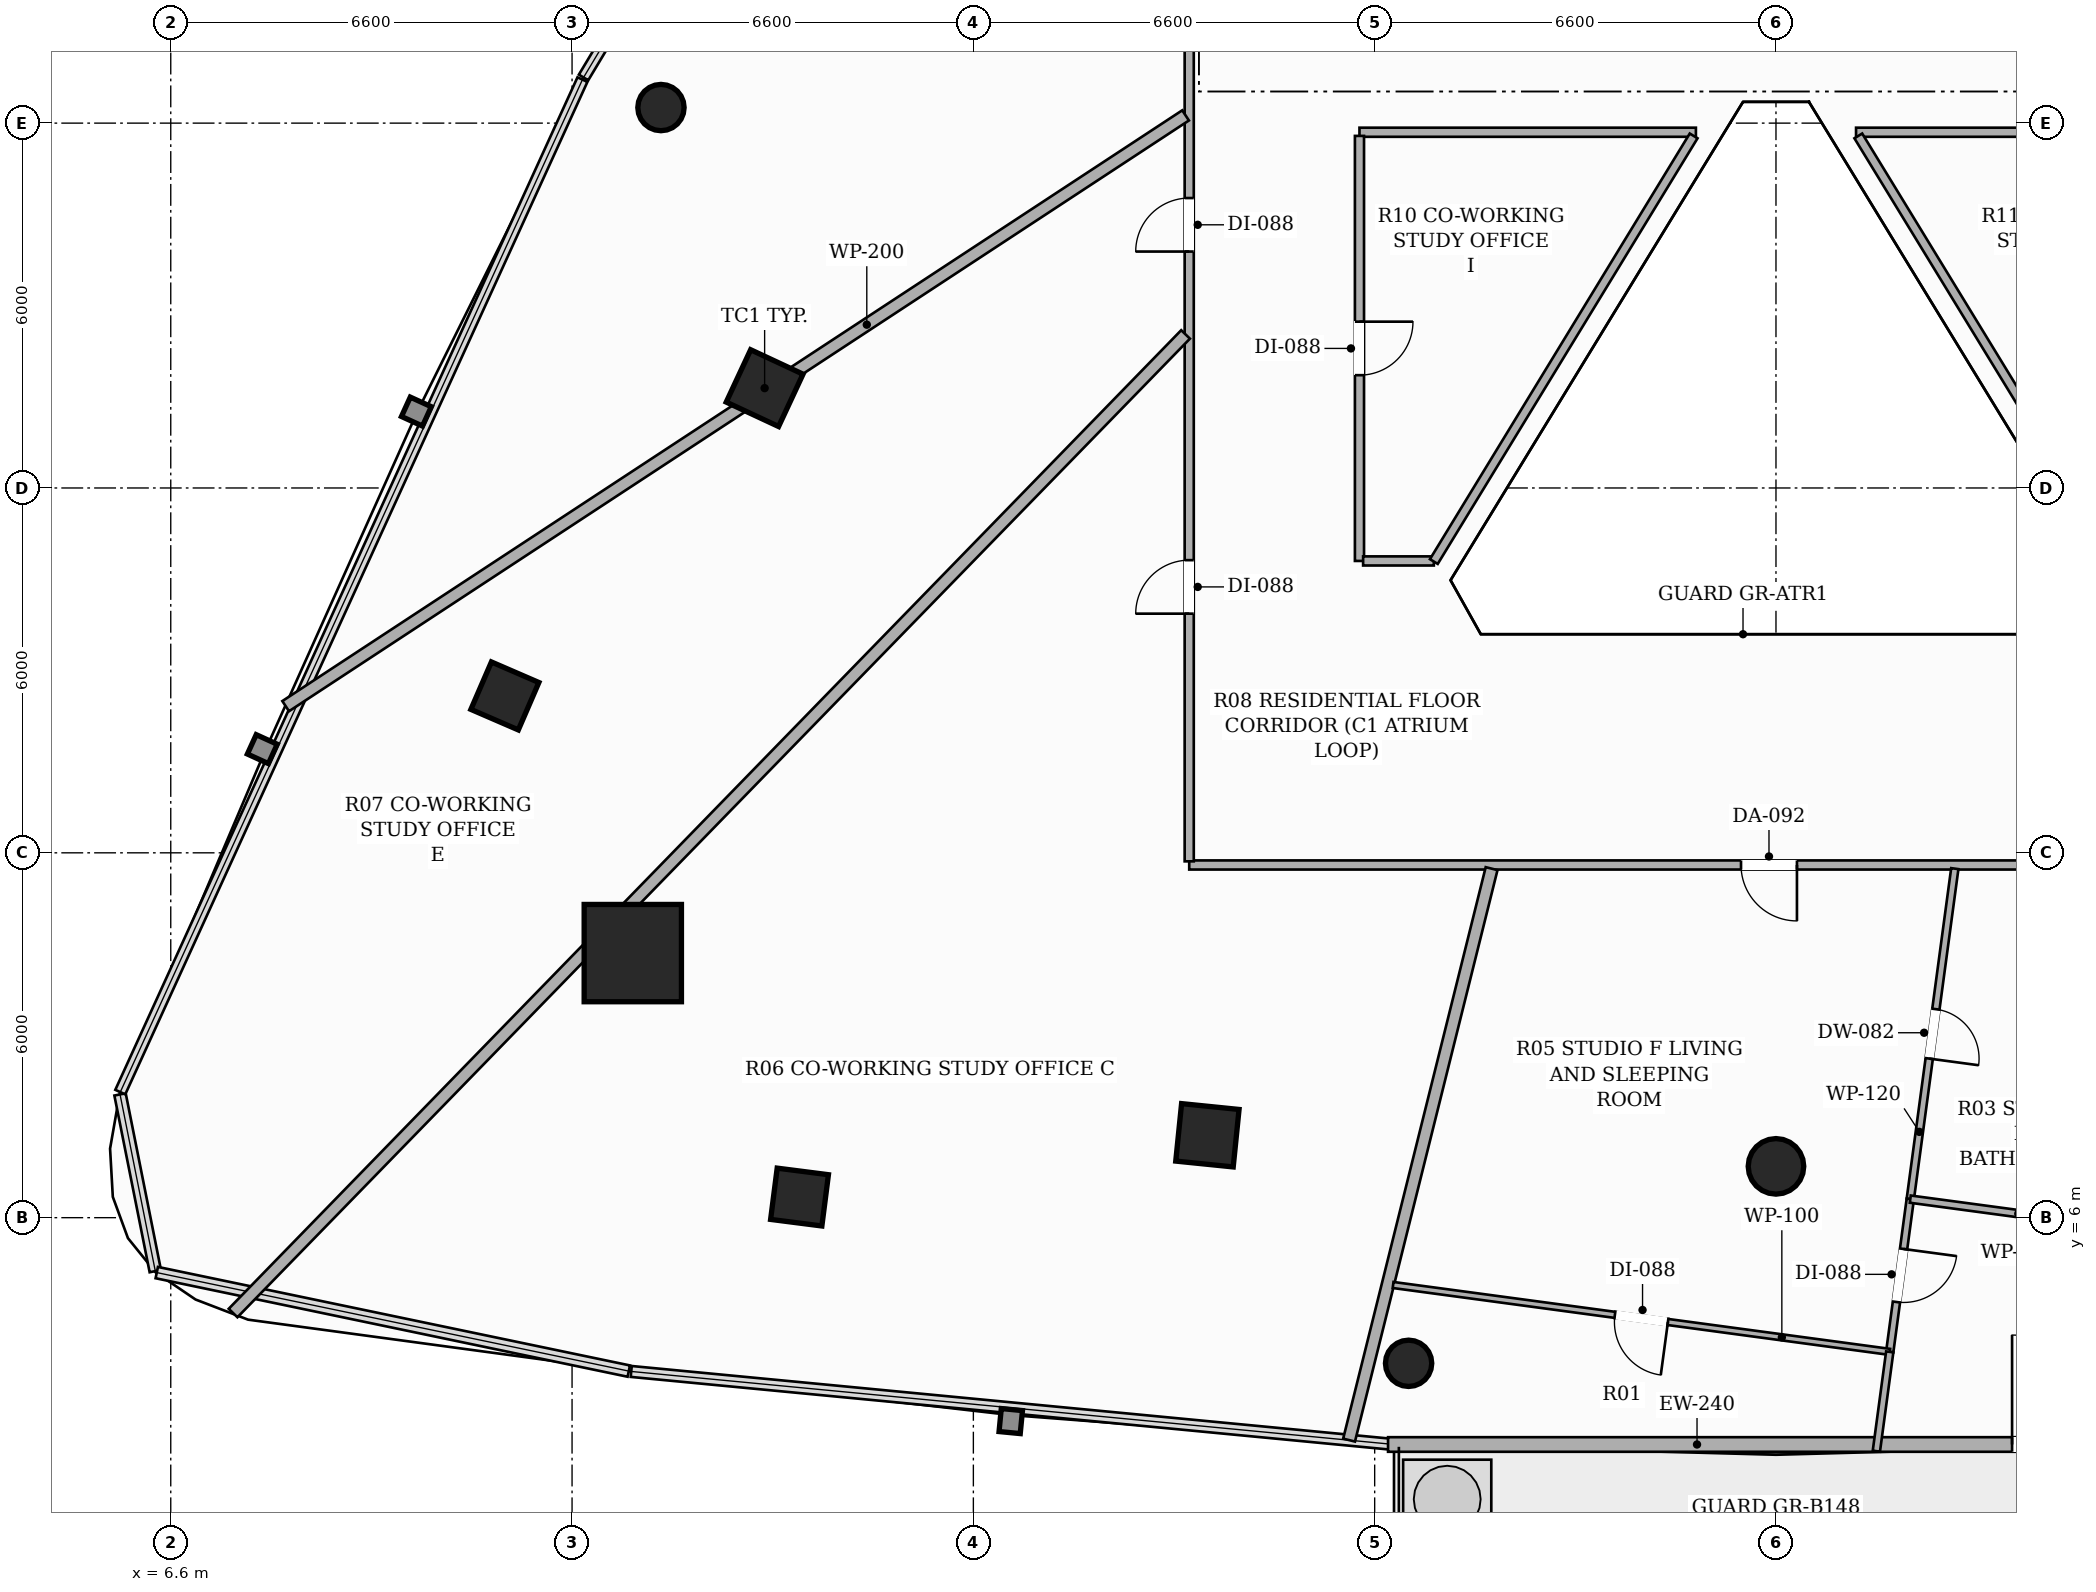
"""IFC4 building model, lengths in metres.
Left out: names, types, materials, properties, quantities, classifications, styles, units other than length and angle.
Written with IfcOpenShell. Run it as: python <this file> out.ifc"""

import sys

from ifc_helpers import new_model, si_unit, direction, frame, frame_2d, origin, origin_2d, place, context, subcontext, project, spatial, rectangle, hollow_rectangle, hollow_circle, extrude, element, fill, save


model = new_model("IFC4")
c1 = context("Model", 3, precision=1e-05, world=origin(), true_north=direction((0.0, 1.0)))
c2 = subcontext(c1, "Body", "Model", "MODEL_VIEW")
j1 = project(units=[si_unit("LENGTHUNIT", "METRE"), si_unit("PLANEANGLEUNIT", "RADIAN")], contexts=[c1])
p1 = place(None, origin())
s1 = spatial("IfcSite", under=j1, at=p1, CompositionType="ELEMENT")
p2 = place(p1, origin())
s2 = spatial("IfcBuilding", under=s1, at=p2, CompositionType="ELEMENT")
p3 = place(p2, frame((0.0, 0.0, 84.05)))
s3 = spatial("IfcBuildingStorey", under=s2, at=p3, CompositionType="ELEMENT", Elevation=84.05)
p4 = place(p3, frame((14.199, 10.351, 0.0), z_axis=(0.0, 0.0, 1.0), x_axis=(1.0, 0.0, 0.0)))
e1 = element("IfcColumn", 1, at=p4, inside=s3, PredefinedType="COLUMN", context=c2, shape_type="SweptSolid", body=[
    extrude(hollow_rectangle(XDim=1.6, YDim=1.6, WallThickness=0.05, at=origin_2d()), origin(), (0.0, 0.0, 1.0), 3.3),
])
for number, where, z_axis, x_axis in (
    (2, (16.367, 19.642, 0.0), (0.0, 0.0, 1.0), (0.423, 0.906, 0.0)),
    (3, (23.649, 7.355, 0.0), (0.0, 0.0, 1.0), (-0.995, 0.101, 0.0)),
):
    element("IfcColumn", number, at=place(p3, frame(where, z_axis=z_axis, x_axis=x_axis)), inside=s3, PredefinedType="COLUMN", context=c2, shape_type="SweptSolid", body=[
        extrude(hollow_rectangle(XDim=0.95, YDim=0.95, WallThickness=0.032, at=origin_2d()), origin(), (0.0, 0.0, 1.0), 3.3),
    ])
p5 = place(p3, frame((33.0, 6.844, 0.0), z_axis=(0.0, 0.0, 1.0), x_axis=(1.0, 0.0, 0.0)))
e4 = element("IfcColumn", 4, at=p5, inside=s3, PredefinedType="COLUMN", context=c2, shape_type="SweptSolid", body=[
    extrude(hollow_circle(Radius=0.457, WallThickness=0.025, at=origin_2d()), origin(), (0.0, 0.0, 1.0), 3.3),
])
for number, where, z_axis, x_axis in (
    (5, (12.095, 14.58, 0.0), (0.0, 0.0, 1.0), (0.397, 0.918, 0.0)),
    (6, (16.941, 6.339, 0.0), (0.0, 0.0, 1.0), (-0.992, 0.127, 0.0)),
):
    element("IfcColumn", number, at=place(p3, frame(where, z_axis=z_axis, x_axis=x_axis)), inside=s3, PredefinedType="COLUMN", context=c2, shape_type="SweptSolid", body=[
        extrude(hollow_rectangle(XDim=0.85, YDim=0.85, WallThickness=0.028, at=origin_2d()), origin(), (0.0, 0.0, 1.0), 3.3),
    ])
for number, where, z_axis, x_axis in (
    (7, (14.662, 24.256, 0.0), (0.0, 0.0, 1.0), (1.0, 0.0, 0.0)),
    (8, (26.958, 3.605, 0.0), (0.0, 0.0, 1.0), (1.0, 0.0, 0.0)),
):
    element("IfcColumn", number, at=place(p3, frame(where, z_axis=z_axis, x_axis=x_axis)), inside=s3, PredefinedType="COLUMN", context=c2, shape_type="SweptSolid", body=[
        extrude(hollow_circle(Radius=0.381, WallThickness=0.022, at=origin_2d()), origin(), (0.0, 0.0, 1.0), 3.3),
    ])
p6 = place(p3, frame((26.62, 2.27, 0.0), z_axis=(0.0, 0.0, 1.0), x_axis=(1.0, 0.0, 0.0)))
e9 = element("IfcWall", 9, at=p6, inside=s3, PredefinedType="SOLIDWALL", context=c2, shape_type="SweptSolid", body=[
    extrude(rectangle(XDim=12.76, YDim=0.24, at=frame_2d((6.38, 0.0))), origin(), (0.0, 0.0, 1.0), 2.624),
])
p7 = place(p6, frame((10.263, 0.0, 0.0)))
e10 = element("IfcOpeningElement", 10, at=p7, cuts=e9, PredefinedType="OPENING", context=c2, shape_type="SweptSolid", body=[
    extrude(rectangle(XDim=1.8, YDim=2.2, at=frame_2d((0.9, 1.1))), frame((0.0, 0.13, 0.0), z_axis=(0.0, -1.0, 0.0), x_axis=(1.0, 0.0, 0.0)), (0.0, 0.0, 1.0), 0.26),
])
p8 = place(p3, frame((42.59, 11.8, 0.0), z_axis=(0.0, 0.0, 1.0), x_axis=(-1.0, 0.0, 0.0)))
e11 = element("IfcWall", 11, at=p8, inside=s3, PredefinedType="PARTITIONING", context=c2, shape_type="SweptSolid", body=[
    extrude(rectangle(XDim=19.24, YDim=0.15, at=frame_2d((9.62, 0.0))), origin(), (0.0, 0.0, 1.0), 2.669),
])
p9 = place(p8, frame((9.245, 0.0, 0.0)))
e12 = element("IfcOpeningElement", 12, at=p9, cuts=e11, PredefinedType="OPENING", context=c2, shape_type="SweptSolid", body=[
    extrude(rectangle(XDim=0.92, YDim=2.15, at=frame_2d((0.46, 1.075))), frame((0.0, 0.085, 0.0), z_axis=(0.0, -1.0, 0.0), x_axis=(1.0, 0.0, 0.0)), (0.0, 0.0, 1.0), 0.17),
])
p10 = place(p3, frame((23.35, 11.86, 0.0), z_axis=(0.0, 0.0, 1.0), x_axis=(0.0, 1.0, 0.0)))
e13 = element("IfcWall", 13, at=p10, inside=s3, PredefinedType="PARTITIONING", context=c2, shape_type="SweptSolid", body=[
    extrude(rectangle(XDim=25.04, YDim=0.15, at=frame_2d((12.52, 0.0))), origin(), (0.0, 0.0, 1.0), 2.413),
])
p11 = place(p10, frame((18.061, 0.0, 0.0)))
e14 = element("IfcOpeningElement", 14, at=p11, cuts=e13, PredefinedType="OPENING", context=c2, shape_type="SweptSolid", body=[
    extrude(rectangle(XDim=0.88, YDim=2.1, at=frame_2d((0.44, 1.05))), frame((0.0, 0.085, 0.0), z_axis=(0.0, -1.0, 0.0), x_axis=(1.0, 0.0, 0.0)), (0.0, 0.0, 1.0), 0.17),
])
p12 = place(p10, frame((4.073, 0.0, 0.0)))
e15 = element("IfcOpeningElement", 15, at=p12, cuts=e13, PredefinedType="OPENING", context=c2, shape_type="SweptSolid", body=[
    extrude(rectangle(XDim=0.88, YDim=2.1, at=frame_2d((0.44, 1.05))), frame((0.0, 0.085, 0.0), z_axis=(0.0, -1.0, 0.0), x_axis=(1.0, 0.0, 0.0)), (0.0, 0.0, 1.0), 0.17),
])
p13 = place(p10, frame((10.028, 0.0, 0.0)))
e16 = element("IfcOpeningElement", 16, at=p13, cuts=e13, PredefinedType="OPENING", context=c2, shape_type="SweptSolid", body=[
    extrude(rectangle(XDim=0.88, YDim=2.1, at=frame_2d((0.44, 1.05))), frame((0.0, 0.085, 0.0), z_axis=(0.0, -1.0, 0.0), x_axis=(1.0, 0.0, 0.0)), (0.0, 0.0, 1.0), 0.17),
])
p14 = place(p3, frame((31.683, 23.85, 0.0), z_axis=(0.0, 0.0, 1.0), x_axis=(-1.0, 0.0, 0.0)))
e17 = element("IfcWall", 17, at=p14, inside=s3, PredefinedType="PARTITIONING", context=c2, shape_type="SweptSolid", body=[
    extrude(rectangle(XDim=5.533, YDim=0.15, at=frame_2d((2.767, 0.0))), origin(), (0.0, 0.0, 1.0), 2.669),
])
p15 = place(p3, frame((26.15, 23.79, 0.0), z_axis=(0.0, 0.0, 1.0), x_axis=(0.0, -1.0, 0.0)))
e18 = element("IfcWall", 18, at=p15, inside=s3, PredefinedType="PARTITIONING", context=c2, shape_type="SweptSolid", body=[
    extrude(rectangle(XDim=6.99, YDim=0.15, at=frame_2d((3.495, 0.0))), origin(), (0.0, 0.0, 1.0), 2.669),
])
p16 = place(p15, frame((3.055, 0.0, 0.0)))
e19 = element("IfcOpeningElement", 19, at=p16, cuts=e18, PredefinedType="OPENING", context=c2, shape_type="SweptSolid", body=[
    extrude(rectangle(XDim=0.88, YDim=2.1, at=frame_2d((0.44, 1.05))), frame((0.0, 0.085, 0.0), z_axis=(0.0, -1.0, 0.0), x_axis=(1.0, 0.0, 0.0)), (0.0, 0.0, 1.0), 0.17),
])
p17 = place(p3, frame((26.21, 16.8, 0.0), z_axis=(0.0, 0.0, 1.0), x_axis=(1.0, 0.0, 0.0)))
e20 = element("IfcWall", 20, at=p17, inside=s3, PredefinedType="PARTITIONING", context=c2, shape_type="SweptSolid", body=[
    extrude(rectangle(XDim=1.163, YDim=0.15, at=frame_2d((0.582, 0.0))), origin(), (0.0, 0.0, 1.0), 3.06),
])
p18 = place(p3, frame((39.79, 23.85, 0.0), z_axis=(0.0, 0.0, 1.0), x_axis=(-1.0, 0.0, 0.0)))
e21 = element("IfcWall", 21, at=p18, inside=s3, PredefinedType="PARTITIONING", context=c2, shape_type="SweptSolid", body=[
    extrude(rectangle(XDim=5.473, YDim=0.15, at=frame_2d((2.737, 0.0))), origin(), (0.0, 0.0, 1.0), 2.669),
])
p19 = place(p3, frame((27.373, 16.79, 0.0), z_axis=(0.0, 0.0, 1.0), x_axis=(0.52102126657, 0.853543695297, 0.0)))
e22 = element("IfcWall", 22, at=p19, inside=s3, PredefinedType="PARTITIONING", context=c2, shape_type="SweptSolid", body=[
    extrude(rectangle(XDim=8.201, YDim=0.15, at=frame_2d((4.101, 0.0))), origin(), (0.0, 0.0, 1.0), 2.669),
])
p20 = place(p3, frame((34.354, 23.79, 0.0), z_axis=(0.0, 0.0, 1.0), x_axis=(0.521564518198, -0.853211845533, 0.0)))
e23 = element("IfcWall", 23, at=p20, inside=s3, PredefinedType="PARTITIONING", context=c2, shape_type="SweptSolid", body=[
    extrude(rectangle(XDim=8.193, YDim=0.15, at=frame_2d((4.096, 0.0))), origin(), (0.0, 0.0, 1.0), 2.669),
])
p21 = place(p3, frame((23.29, 24.127, 0.0), z_axis=(0.0, 0.0, 1.0), x_axis=(-0.835988009382, -0.548747709034, 0.0)))
e24 = element("IfcWall", 24, at=p21, inside=s3, PredefinedType="PARTITIONING", context=c2, shape_type="SweptSolid", body=[
    extrude(rectangle(XDim=17.704, YDim=0.2, at=frame_2d((8.852, 0.0))), origin(), (0.0, 0.0, 1.0), 2.413),
])
p22 = place(p3, frame((7.625, 4.432, 0.0), z_axis=(0.0, 0.0, 1.0), x_axis=(0.697514321206, 0.716570842075, 0.0)))
e25 = element("IfcWall", 25, at=p22, inside=s3, PredefinedType="PARTITIONING", context=c2, shape_type="SweptSolid", body=[
    extrude(rectangle(XDim=22.458, YDim=0.2, at=frame_2d((11.229, 0.0))), origin(), (0.0, 0.0, 1.0), 2.413),
])
p23 = place(p3, frame((28.323, 11.74, 0.0), z_axis=(0.0, 0.0, 1.0), x_axis=(-0.242001816391, -0.970275796289, 0.0)))
e26 = element("IfcWall", 26, at=p23, inside=s3, PredefinedType="PARTITIONING", context=c2, shape_type="SweptSolid", body=[
    extrude(rectangle(XDim=9.686, YDim=0.2, at=frame_2d((4.843, 0.0))), origin(), (0.0, 0.0, 1.0), 2.413),
])
p24 = place(p3, frame((35.941, 11.74, 0.0), z_axis=(0.0, 0.0, 1.0), x_axis=(-0.133464146048, -0.991053642201, 0.0)))
e27 = element("IfcWall", 27, at=p24, inside=s3, PredefinedType="PARTITIONING", context=c2, shape_type="SweptSolid", body=[
    extrude(rectangle(XDim=5.484, YDim=0.12, at=frame_2d((2.742, 0.0))), origin(), (0.0, 0.0, 1.0), 2.669),
])
p25 = place(p24, frame((2.332, 0.0, 0.0)))
e28 = element("IfcOpeningElement", 28, at=p25, cuts=e27, PredefinedType="OPENING", context=c2, shape_type="SweptSolid", body=[
    extrude(rectangle(XDim=0.82, YDim=2.1, at=frame_2d((0.41, 1.05))), frame((0.0, 0.07, 0.0), z_axis=(0.0, -1.0, 0.0), x_axis=(1.0, 0.0, 0.0)), (0.0, 0.0, 1.0), 0.14),
])
p26 = place(p3, frame((35.209, 6.305, 0.0), z_axis=(0.0, 0.0, 1.0), x_axis=(-0.133311944021, -0.991074127188, 0.0)))
e29 = element("IfcWall", 29, at=p26, inside=s3, PredefinedType="PARTITIONING", context=c2, shape_type="SweptSolid", body=[
    extrude(rectangle(XDim=2.535, YDim=0.12, at=frame_2d((1.267, 0.0))), origin(), (0.0, 0.0, 1.0), 2.413),
])
p27 = place(p26, frame((0.827, 0.0, 0.0)))
e30 = element("IfcOpeningElement", 30, at=p27, cuts=e29, PredefinedType="OPENING", context=c2, shape_type="SweptSolid", body=[
    extrude(rectangle(XDim=0.88, YDim=2.1, at=frame_2d((0.44, 1.05))), frame((0.0, 0.07, 0.0), z_axis=(0.0, -1.0, 0.0), x_axis=(1.0, 0.0, 0.0)), (0.0, 0.0, 1.0), 0.14),
])
p28 = place(p3, frame((34.871, 3.793, 0.0), z_axis=(0.0, 0.0, 1.0), x_axis=(-0.991052148622, 0.133475236324, 0.0)))
e31 = element("IfcWall", 31, at=p28, inside=s3, PredefinedType="PARTITIONING", context=c2, shape_type="SweptSolid", body=[
    extrude(rectangle(XDim=8.242, YDim=0.1, at=frame_2d((4.121, 0.0))), origin(), (0.0, 0.0, 1.0), 2.413),
])
p29 = place(p28, frame((3.681, 0.0, 0.0)))
e32 = element("IfcOpeningElement", 32, at=p29, cuts=e31, PredefinedType="OPENING", context=c2, shape_type="SweptSolid", body=[
    extrude(rectangle(XDim=0.88, YDim=2.1, at=frame_2d((0.44, 1.05))), frame((0.0, 0.06, 0.0), z_axis=(0.0, -1.0, 0.0), x_axis=(1.0, 0.0, 0.0)), (0.0, 0.0, 1.0), 0.12),
])
p30 = place(p3, frame((38.761, 5.827, 0.0), z_axis=(0.0, 0.0, 1.0), x_axis=(-0.991065337555, 0.133377272042, 0.0)))
e33 = element("IfcWall", 33, at=p30, inside=s3, PredefinedType="PARTITIONING", context=c2, shape_type="SweptSolid", body=[
    extrude(rectangle(XDim=3.584, YDim=0.12, at=frame_2d((1.792, 0.0))), origin(), (0.0, 0.0, 1.0), 2.669),
])
p31 = place(p3, frame((34.651, 2.16, 0.0), z_axis=(0.0, 0.0, 1.0), x_axis=(0.133638685836, 0.991030121463, 0.0)))
e34 = element("IfcWall", 34, at=p31, inside=s3, PredefinedType="PARTITIONING", context=c2, shape_type="SweptSolid", body=[
    extrude(rectangle(XDim=1.648, YDim=0.12, at=frame_2d((0.824, 0.0))), origin(), (0.0, 0.0, 1.0), 3.06),
])
p32 = place(p7, origin())
e35 = element("IfcDoor", 35, at=p32, inside=s3, OperationType="SINGLE_SWING_LEFT", PredefinedType="DOOR", context=c2, shape_type="SweptSolid", body=[
    extrude(rectangle(XDim=1.8, YDim=2.2, at=frame_2d((0.9, 1.1))), frame((0.0, 0.025, 0.0), z_axis=(0.0, -1.0, 0.0), x_axis=(1.0, 0.0, 0.0)), (0.0, 0.0, 1.0), 0.05),
])
fill(e10, e35)
p33 = place(p12, origin())
e36 = element("IfcDoor", 36, at=p33, inside=s3, OperationType="SINGLE_SWING_LEFT", PredefinedType="DOOR", context=c2, shape_type="SweptSolid", body=[
    extrude(rectangle(XDim=0.88, YDim=2.1, at=frame_2d((0.44, 1.05))), frame((0.0, 0.025, 0.0), z_axis=(0.0, -1.0, 0.0), x_axis=(1.0, 0.0, 0.0)), (0.0, 0.0, 1.0), 0.05),
])
fill(e15, e36)
p34 = place(p13, origin())
e37 = element("IfcDoor", 37, at=p34, inside=s3, OperationType="SINGLE_SWING_LEFT", PredefinedType="DOOR", context=c2, shape_type="SweptSolid", body=[
    extrude(rectangle(XDim=0.88, YDim=2.1, at=frame_2d((0.44, 1.05))), frame((0.0, 0.025, 0.0), z_axis=(0.0, -1.0, 0.0), x_axis=(1.0, 0.0, 0.0)), (0.0, 0.0, 1.0), 0.05),
])
fill(e16, e37)
p35 = place(p9, origin())
e38 = element("IfcDoor", 38, at=p35, inside=s3, OperationType="SINGLE_SWING_LEFT", PredefinedType="DOOR", context=c2, shape_type="SweptSolid", body=[
    extrude(rectangle(XDim=0.92, YDim=2.15, at=frame_2d((0.46, 1.075))), frame((0.0, 0.025, 0.0), z_axis=(0.0, -1.0, 0.0), x_axis=(1.0, 0.0, 0.0)), (0.0, 0.0, 1.0), 0.05),
])
fill(e12, e38)
p36 = place(p25, origin())
e39 = element("IfcDoor", 39, at=p36, inside=s3, OperationType="SINGLE_SWING_RIGHT", PredefinedType="DOOR", context=c2, shape_type="SweptSolid", body=[
    extrude(rectangle(XDim=0.82, YDim=2.1, at=frame_2d((0.41, 1.05))), frame((0.0, 0.025, 0.0), z_axis=(0.0, -1.0, 0.0), x_axis=(1.0, 0.0, 0.0)), (0.0, 0.0, 1.0), 0.05),
])
fill(e28, e39)
p37 = place(p27, origin())
e40 = element("IfcDoor", 40, at=p37, inside=s3, OperationType="SINGLE_SWING_LEFT", PredefinedType="DOOR", context=c2, shape_type="SweptSolid", body=[
    extrude(rectangle(XDim=0.88, YDim=2.1, at=frame_2d((0.44, 1.05))), frame((0.0, 0.025, 0.0), z_axis=(0.0, -1.0, 0.0), x_axis=(1.0, 0.0, 0.0)), (0.0, 0.0, 1.0), 0.05),
])
fill(e30, e40)
p38 = place(p29, origin())
e41 = element("IfcDoor", 41, at=p38, inside=s3, OperationType="SINGLE_SWING_LEFT", PredefinedType="DOOR", context=c2, shape_type="SweptSolid", body=[
    extrude(rectangle(XDim=0.88, YDim=2.1, at=frame_2d((0.44, 1.05))), frame((0.0, 0.025, 0.0), z_axis=(0.0, -1.0, 0.0), x_axis=(1.0, 0.0, 0.0)), (0.0, 0.0, 1.0), 0.05),
])
fill(e32, e41)
p39 = place(p16, origin())
e42 = element("IfcDoor", 42, at=p39, inside=s3, OperationType="SINGLE_SWING_LEFT", PredefinedType="DOOR", context=c2, shape_type="SweptSolid", body=[
    extrude(rectangle(XDim=0.88, YDim=2.1, at=frame_2d((0.44, 1.05))), frame((0.0, 0.025, 0.0), z_axis=(0.0, -1.0, 0.0), x_axis=(1.0, 0.0, 0.0)), (0.0, 0.0, 1.0), 0.05),
])
fill(e19, e42)
save(model, sys.argv[1])
